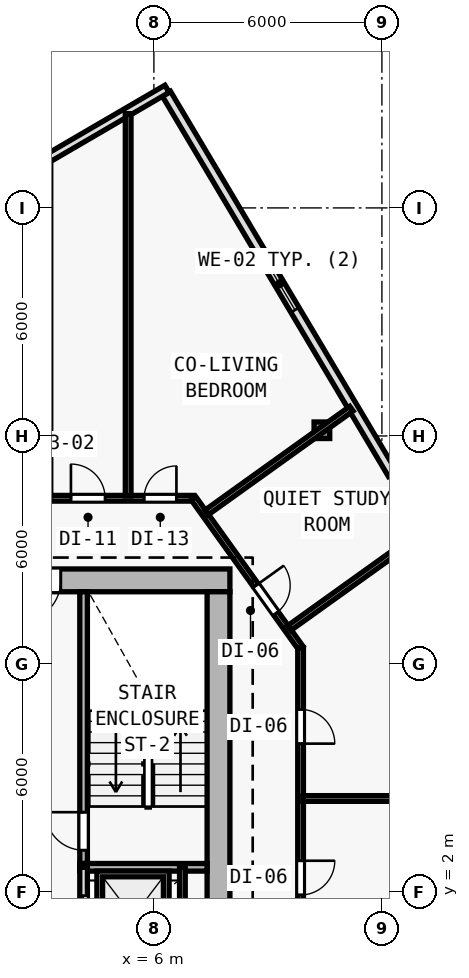
"""IFC4 building model, lengths in metres.
Left out: names, types, materials, properties, quantities, classifications, styles, units other than length and angle.
Written with IfcOpenShell. Run it as: python <this file> out.ifc"""

import sys

from ifc_helpers import new_model, si_unit, direction, frame, frame_2d, origin, origin_2d, place, context, subcontext, project, spatial, rectangle, i_section, extrude, element, fill, save


model = new_model("IFC4")
c1 = context("Model", 3, precision=1e-05, world=origin(), true_north=direction((0.0, 1.0)))
c2 = subcontext(c1, "Body", "Model", "MODEL_VIEW")
j1 = project(units=[si_unit("LENGTHUNIT", "METRE"), si_unit("PLANEANGLEUNIT", "RADIAN")], contexts=[c1])
p1 = place(None, origin())
s1 = spatial("IfcSite", under=j1, at=p1, CompositionType="ELEMENT")
p2 = place(p1, origin())
s2 = spatial("IfcBuilding", under=s1, at=p2, CompositionType="ELEMENT")
p3 = place(p2, frame((0.0, 0.0, 66.0)))
s3 = spatial("IfcBuildingStorey", under=s2, at=p3, CompositionType="ELEMENT", Elevation=66.0)
p4 = place(p3, frame((7.7, 10.2, 0.0), z_axis=(0.0, 0.0, 1.0), x_axis=(1.0, 0.0, 0.0)))
e1 = element("IfcColumn", 1, at=p4, inside=s3, PredefinedType="COLUMN", context=c2, shape_type="SweptSolid", body=[
    extrude(i_section(OverallWidth=0.416, OverallDepth=0.446, WebThickness=0.025, FlangeThickness=0.04, FilletRadius=0.015, at=origin_2d()), origin(), (0.0, 0.0, 1.0), 3.6),
])
p5 = place(p3, frame((10.421, 14.15, 0.006), z_axis=(-0.011699840322, -0.002584848443, 0.999928213571), x_axis=(0.215728093413, -0.976453475447, 0.0)))
e2 = element("IfcColumn", 2, at=p5, inside=s3, PredefinedType="COLUMN", context=c2, shape_type="SweptSolid", body=[
    extrude(i_section(OverallWidth=0.412, OverallDepth=0.435, WebThickness=0.023, FlangeThickness=0.037, FilletRadius=0.015, at=origin_2d()), origin(), (0.0, 0.0, 1.0), 3.589),
])
p6 = place(p3, frame((6.328, 23.006, 0.0), z_axis=(0.0, 0.0, 1.0), x_axis=(0.511075811474, -0.859535639125, 0.0)))
e3 = element("IfcWall", 3, at=p6, inside=s3, PredefinedType="SOLIDWALL", context=c2, shape_type="SweptSolid", body=[
    extrude(rectangle(XDim=11.646, YDim=0.25, at=frame_2d((5.823, 0.0))), origin(), (0.0, 0.0, 1.0), 3.35),
])
p7 = place(p6, frame((5.023, 0.0, 0.62)))
e4 = element("IfcOpeningElement", 4, at=p7, cuts=e3, PredefinedType="OPENING", context=c2, shape_type="SweptSolid", body=[
    extrude(rectangle(XDim=1.6, YDim=2.1, at=frame_2d((0.8, 1.05))), frame((0.0, 0.135, 0.0), z_axis=(0.0, -1.0, 0.0), x_axis=(1.0, 0.0, 0.0)), (0.0, 0.0, 1.0), 0.27),
])
p8 = place(p3, frame((2.193, 20.713, 0.0), z_axis=(0.0, 0.0, 1.0), x_axis=(0.863964978951, 0.503551899159, 0.0)))
e5 = element("IfcWall", 5, at=p8, inside=s3, PredefinedType="SOLIDWALL", context=c2, shape_type="SweptSolid", body=[
    extrude(rectangle(XDim=4.805, YDim=0.22, at=frame_2d((2.402, 0.0))), origin(), (0.0, 0.0, 1.0), 3.35),
])
p9 = place(p3, frame((8.0, 10.2, 0.0), z_axis=(0.0, 0.0, 1.0), x_axis=(-1.0, 0.0, 0.0)))
e6 = element("IfcWall", 6, at=p9, inside=s3, PredefinedType="SHEAR", context=c2, shape_type="SweptSolid", body=[
    extrude(rectangle(XDim=16.0, YDim=0.6, at=frame_2d((8.0, 0.0))), origin(), (0.0, 0.0, 1.0), 3.35),
])
p10 = place(p9, frame((4.45, 0.0, 0.0)))
e7 = element("IfcOpeningElement", 7, at=p10, cuts=e6, PredefinedType="OPENING", context=c2, shape_type="SweptSolid", body=[
    extrude(rectangle(XDim=1.1, YDim=2.15, at=frame_2d((0.55, 1.075))), frame((0.0, 0.31, 0.0), z_axis=(0.0, -1.0, 0.0), x_axis=(1.0, 0.0, 0.0)), (0.0, 0.0, 1.0), 0.62),
])
p11 = place(p3, frame((7.7, 9.9, 0.0), z_axis=(0.0, 0.0, 1.0), x_axis=(0.0, -1.0, 0.0)))
e8 = element("IfcWall", 8, at=p11, inside=s3, PredefinedType="SHEAR", context=c2, shape_type="SweptSolid", body=[
    extrude(rectangle(XDim=19.0, YDim=0.6, at=frame_2d((9.5, 0.0))), origin(), (0.0, 0.0, 1.0), 3.35),
])
p12 = place(p3, frame((4.15, 2.75, 0.0), z_axis=(0.0, 0.0, 1.0), x_axis=(0.0, 1.0, 0.0)))
e9 = element("IfcWall", 9, at=p12, inside=s3, PredefinedType="SOLIDWALL", context=c2, shape_type="SweptSolid", body=[
    extrude(rectangle(XDim=7.15, YDim=0.2, at=frame_2d((3.575, 0.0))), origin(), (0.0, 0.0, 1.0), 3.35),
])
p13 = place(p12, frame((0.35, 0.0, 0.0)))
e10 = element("IfcOpeningElement", 10, at=p13, cuts=e9, PredefinedType="OPENING", context=c2, shape_type="SweptSolid", body=[
    extrude(rectangle(XDim=1.0, YDim=2.15, at=frame_2d((0.5, 1.075))), frame((0.0, 0.11, 0.0), z_axis=(0.0, -1.0, 0.0), x_axis=(1.0, 0.0, 0.0)), (0.0, 0.0, 1.0), 0.22),
])
p14 = place(p3, frame((4.05, 2.65, 0.0), z_axis=(0.0, 0.0, 1.0), x_axis=(1.0, 0.0, 0.0)))
e11 = element("IfcWall", 11, at=p14, inside=s3, PredefinedType="SOLIDWALL", context=c2, shape_type="SweptSolid", body=[
    extrude(rectangle(XDim=3.35, YDim=0.2, at=frame_2d((1.675, 0.0))), origin(), (0.0, 0.0, 1.0), 3.35),
])
p15 = place(p3, frame((4.15, -6.05, 0.0), z_axis=(0.0, 0.0, 1.0), x_axis=(0.0, 1.0, 0.0)))
e12 = element("IfcWall", 12, at=p15, inside=s3, PredefinedType="SOLIDWALL", context=c2, shape_type="SweptSolid", body=[
    extrude(rectangle(XDim=8.7, YDim=0.2, at=frame_2d((4.35, 0.0))), origin(), (0.0, 0.0, 1.0), 3.35),
])
p16 = place(p15, frame((0.55, 0.0, 0.0)))
e13 = element("IfcOpeningElement", 13, at=p16, cuts=e12, PredefinedType="OPENING", context=c2, shape_type="SweptSolid", body=[
    extrude(rectangle(XDim=1.1, YDim=2.15, at=frame_2d((0.55, 1.075))), frame((0.0, 0.11, 0.0), z_axis=(0.0, -1.0, 0.0), x_axis=(1.0, 0.0, 0.0)), (0.0, 0.0, 1.0), 0.22),
])
p17 = place(p15, frame((2.65, 0.0, 0.0)))
e14 = element("IfcOpeningElement", 14, at=p17, cuts=e12, PredefinedType="OPENING", context=c2, shape_type="SweptSolid", body=[
    extrude(rectangle(XDim=1.1, YDim=2.15, at=frame_2d((0.55, 1.075))), frame((0.0, 0.11, 0.0), z_axis=(0.0, -1.0, 0.0), x_axis=(1.0, 0.0, 0.0)), (0.0, 0.0, 1.0), 0.22),
])
p18 = place(p15, frame((4.75, 0.0, 0.0)))
e15 = element("IfcOpeningElement", 15, at=p18, cuts=e12, PredefinedType="OPENING", context=c2, shape_type="SweptSolid", body=[
    extrude(rectangle(XDim=1.1, YDim=2.15, at=frame_2d((0.55, 1.075))), frame((0.0, 0.11, 0.0), z_axis=(0.0, -1.0, 0.0), x_axis=(1.0, 0.0, 0.0)), (0.0, 0.0, 1.0), 0.22),
])
p19 = place(p15, frame((6.85, 0.0, 0.0)))
e16 = element("IfcOpeningElement", 16, at=p19, cuts=e12, PredefinedType="OPENING", context=c2, shape_type="SweptSolid", body=[
    extrude(rectangle(XDim=1.1, YDim=2.15, at=frame_2d((0.55, 1.075))), frame((0.0, 0.11, 0.0), z_axis=(0.0, -1.0, 0.0), x_axis=(1.0, 0.0, 0.0)), (0.0, 0.0, 1.0), 0.22),
])
p20 = place(p3, frame((6.75, -6.05, 0.0), z_axis=(0.0, 0.0, 1.0), x_axis=(0.0, 1.0, 0.0)))
e17 = element("IfcWall", 17, at=p20, inside=s3, PredefinedType="PARTITIONING", context=c2, shape_type="SweptSolid", body=[
    extrude(rectangle(XDim=8.7, YDim=0.15, at=frame_2d((4.35, 0.0))), origin(), (0.0, 0.0, 1.0), 3.35),
])
p21 = place(p3, frame((-7.041, 12.36, 0.0), z_axis=(0.0, 0.0, 1.0), x_axis=(1.0, 0.0, 0.0)))
e18 = element("IfcWall", 18, at=p21, inside=s3, PredefinedType="PARTITIONING", context=c2, shape_type="SweptSolid", body=[
    extrude(rectangle(XDim=14.082, YDim=0.15, at=frame_2d((7.041, 0.0))), origin(), (0.0, 0.0, 1.0), 3.35),
])
p22 = place(p21, frame((12.784, 0.0, 0.0)))
e19 = element("IfcOpeningElement", 19, at=p22, cuts=e18, PredefinedType="OPENING", context=c2, shape_type="SweptSolid", body=[
    extrude(rectangle(XDim=0.85, YDim=2.1, at=frame_2d((0.425, 1.05))), frame((0.0, 0.085, 0.0), z_axis=(0.0, -1.0, 0.0), x_axis=(1.0, 0.0, 0.0)), (0.0, 0.0, 1.0), 0.17),
])
p23 = place(p21, frame((10.858, 0.0, 0.0)))
e20 = element("IfcOpeningElement", 20, at=p23, cuts=e18, PredefinedType="OPENING", context=c2, shape_type="SweptSolid", body=[
    extrude(rectangle(XDim=0.9, YDim=2.1, at=frame_2d((0.45, 1.05))), frame((0.0, 0.085, 0.0), z_axis=(0.0, -1.0, 0.0), x_axis=(1.0, 0.0, 0.0)), (0.0, 0.0, 1.0), 0.17),
])
p24 = place(p21, frame((8.904, 0.0, 0.0)))
e21 = element("IfcOpeningElement", 21, at=p24, cuts=e18, PredefinedType="OPENING", context=c2, shape_type="SweptSolid", body=[
    extrude(rectangle(XDim=0.85, YDim=2.1, at=frame_2d((0.425, 1.05))), frame((0.0, 0.085, 0.0), z_axis=(0.0, -1.0, 0.0), x_axis=(1.0, 0.0, 0.0)), (0.0, 0.0, 1.0), 0.17),
])
p25 = place(p21, frame((6.212, 0.0, 0.0)))
e22 = element("IfcOpeningElement", 22, at=p25, cuts=e18, PredefinedType="OPENING", context=c2, shape_type="SweptSolid", body=[
    extrude(rectangle(XDim=0.9, YDim=2.1, at=frame_2d((0.45, 1.05))), frame((0.0, 0.085, 0.0), z_axis=(0.0, -1.0, 0.0), x_axis=(1.0, 0.0, 0.0)), (0.0, 0.0, 1.0), 0.17),
])
p26 = place(p21, frame((3.763, 0.0, 0.0)))
e23 = element("IfcOpeningElement", 23, at=p26, cuts=e18, PredefinedType="OPENING", context=c2, shape_type="SweptSolid", body=[
    extrude(rectangle(XDim=0.85, YDim=2.1, at=frame_2d((0.425, 1.05))), frame((0.0, 0.085, 0.0), z_axis=(0.0, -1.0, 0.0), x_axis=(1.0, 0.0, 0.0)), (0.0, 0.0, 1.0), 0.17),
])
p27 = place(p21, frame((2.429, 0.0, 0.0)))
e24 = element("IfcOpeningElement", 24, at=p27, cuts=e18, PredefinedType="OPENING", context=c2, shape_type="SweptSolid", body=[
    extrude(rectangle(XDim=0.85, YDim=2.1, at=frame_2d((0.425, 1.05))), frame((0.0, 0.085, 0.0), z_axis=(0.0, -1.0, 0.0), x_axis=(1.0, 0.0, 0.0)), (0.0, 0.0, 1.0), 0.17),
])
p28 = place(p21, frame((0.74, 0.0, 0.0)))
e25 = element("IfcOpeningElement", 25, at=p28, cuts=e18, PredefinedType="OPENING", context=c2, shape_type="SweptSolid", body=[
    extrude(rectangle(XDim=0.9, YDim=2.1, at=frame_2d((0.45, 1.05))), frame((0.0, 0.085, 0.0), z_axis=(0.0, -1.0, 0.0), x_axis=(1.0, 0.0, 0.0)), (0.0, 0.0, 1.0), 0.17),
])
p29 = place(p3, frame((7.041, 12.36, 0.0), z_axis=(0.0, 0.0, 1.0), x_axis=(0.582449511476, -0.812866881218, 0.0)))
e26 = element("IfcWall", 26, at=p29, inside=s3, PredefinedType="PARTITIONING", context=c2, shape_type="SweptSolid", body=[
    extrude(rectangle(XDim=4.84, YDim=0.15, at=frame_2d((2.42, 0.0))), origin(), (0.0, 0.0, 1.0), 2.725),
])
p30 = place(p29, frame((2.825, 0.0, 0.0)))
e27 = element("IfcOpeningElement", 27, at=p30, cuts=e26, PredefinedType="OPENING", context=c2, shape_type="SweptSolid", body=[
    extrude(rectangle(XDim=0.9, YDim=2.1, at=frame_2d((0.45, 1.05))), frame((0.0, 0.085, 0.0), z_axis=(0.0, -1.0, 0.0), x_axis=(1.0, 0.0, 0.0)), (0.0, 0.0, 1.0), 0.17),
])
p31 = place(p3, frame((9.86, 8.426, 0.0), z_axis=(0.0, 0.0, 1.0), x_axis=(0.0, -1.0, 0.0)))
e28 = element("IfcWall", 28, at=p31, inside=s3, PredefinedType="PARTITIONING", context=c2, shape_type="SweptSolid", body=[
    extrude(rectangle(XDim=19.986, YDim=0.15, at=frame_2d((9.993, 0.0))), origin(), (0.0, 0.0, 1.0), 2.609),
])
p32 = place(p31, frame((18.142, 0.0, 0.0)))
e29 = element("IfcOpeningElement", 29, at=p32, cuts=e28, PredefinedType="OPENING", context=c2, shape_type="SweptSolid", body=[
    extrude(rectangle(XDim=0.9, YDim=2.1, at=frame_2d((0.45, 1.05))), frame((0.0, 0.085, 0.0), z_axis=(0.0, -1.0, 0.0), x_axis=(1.0, 0.0, 0.0)), (0.0, 0.0, 1.0), 0.17),
])
p33 = place(p31, frame((14.362, 0.0, 0.0)))
e30 = element("IfcOpeningElement", 30, at=p33, cuts=e28, PredefinedType="OPENING", context=c2, shape_type="SweptSolid", body=[
    extrude(rectangle(XDim=0.9, YDim=2.1, at=frame_2d((0.45, 1.05))), frame((0.0, 0.085, 0.0), z_axis=(0.0, -1.0, 0.0), x_axis=(1.0, 0.0, 0.0)), (0.0, 0.0, 1.0), 0.17),
])
p34 = place(p31, frame((9.744, 0.0, 0.0)))
e31 = element("IfcOpeningElement", 31, at=p34, cuts=e28, PredefinedType="OPENING", context=c2, shape_type="SweptSolid", body=[
    extrude(rectangle(XDim=0.9, YDim=2.1, at=frame_2d((0.45, 1.05))), frame((0.0, 0.085, 0.0), z_axis=(0.0, -1.0, 0.0), x_axis=(1.0, 0.0, 0.0)), (0.0, 0.0, 1.0), 0.17),
])
p35 = place(p31, frame((5.604, 0.0, 0.0)))
e32 = element("IfcOpeningElement", 32, at=p35, cuts=e28, PredefinedType="OPENING", context=c2, shape_type="SweptSolid", body=[
    extrude(rectangle(XDim=0.9, YDim=2.1, at=frame_2d((0.45, 1.05))), frame((0.0, 0.085, 0.0), z_axis=(0.0, -1.0, 0.0), x_axis=(1.0, 0.0, 0.0)), (0.0, 0.0, 1.0), 0.17),
])
p36 = place(p31, frame((1.622, 0.0, 0.0)))
e33 = element("IfcOpeningElement", 33, at=p36, cuts=e28, PredefinedType="OPENING", context=c2, shape_type="SweptSolid", body=[
    extrude(rectangle(XDim=0.9, YDim=2.1, at=frame_2d((0.45, 1.05))), frame((0.0, 0.085, 0.0), z_axis=(0.0, -1.0, 0.0), x_axis=(1.0, 0.0, 0.0)), (0.0, 0.0, 1.0), 0.17),
])
p37 = place(p3, frame((7.384, 11.984, 0.0), z_axis=(0.0, 0.0, 1.0), x_axis=(0.812878301618, 0.582433572829, 0.0)))
e34 = element("IfcWall", 34, at=p37, inside=s3, PredefinedType="PARTITIONING", context=c2, shape_type="SweptSolid", body=[
    extrude(rectangle(XDim=4.692, YDim=0.15, at=frame_2d((2.346, 0.0))), origin(), (0.0, 0.0, 1.0), 2.725),
])
p38 = place(p3, frame((5.323, 12.42, 0.0), z_axis=(0.0, 0.0, 1.0), x_axis=(0.0, 1.0, 0.0)))
e35 = element("IfcWall", 35, at=p38, inside=s3, PredefinedType="PARTITIONING", context=c2, shape_type="SweptSolid", body=[
    extrude(rectangle(XDim=10.06, YDim=0.15, at=frame_2d((5.03, 0.0))), origin(), (0.0, 0.0, 1.0), 2.735),
])
p39 = place(p3, frame((9.92, 4.46, 0.0), z_axis=(0.0, 0.0, 1.0), x_axis=(1.0, 0.0, 0.0)))
e36 = element("IfcWall", 36, at=p39, inside=s3, PredefinedType="PARTITIONING", context=c2, shape_type="SweptSolid", body=[
    extrude(rectangle(XDim=7.377, YDim=0.15, at=frame_2d((3.689, 0.0))), origin(), (0.0, 0.0, 1.0), 2.735),
])
p40 = place(p3, frame((9.562, 8.945, 0.0), z_axis=(0.0, 0.0, 1.0), x_axis=(0.812868674116, 0.582447009299, 0.0)))
e37 = element("IfcWall", 37, at=p40, inside=s3, PredefinedType="PARTITIONING", context=c2, shape_type="SweptSolid", body=[
    extrude(rectangle(XDim=4.373, YDim=0.15, at=frame_2d((2.187, 0.0))), origin(), (0.0, 0.0, 1.0), 2.735),
])
p41 = place(p7, origin())
e38 = element("IfcWindow", 38, at=p41, inside=s3, PartitioningType="SINGLE_PANEL", PredefinedType="WINDOW", context=c2, shape_type="SweptSolid", body=[
    extrude(rectangle(XDim=1.6, YDim=2.1, at=frame_2d((0.8, 1.05))), frame((0.0, 0.03, 0.0), z_axis=(0.0, -1.0, 0.0), x_axis=(1.0, 0.0, 0.0)), (0.0, 0.0, 1.0), 0.06),
])
fill(e4, e38)
p42 = place(p10, origin())
e39 = element("IfcDoor", 39, at=p42, inside=s3, OperationType="SINGLE_SWING_RIGHT", PredefinedType="DOOR", context=c2, shape_type="SweptSolid", body=[
    extrude(rectangle(XDim=1.1, YDim=2.15, at=frame_2d((0.55, 1.075))), frame((0.0, 0.025, 0.0), z_axis=(0.0, -1.0, 0.0), x_axis=(1.0, 0.0, 0.0)), (0.0, 0.0, 1.0), 0.05),
])
fill(e7, e39)
p43 = place(p13, origin())
e40 = element("IfcDoor", 40, at=p43, inside=s3, OperationType="SINGLE_SWING_RIGHT", PredefinedType="DOOR", context=c2, shape_type="SweptSolid", body=[
    extrude(rectangle(XDim=1.0, YDim=2.15, at=frame_2d((0.5, 1.075))), frame((0.0, 0.025, 0.0), z_axis=(0.0, -1.0, 0.0), x_axis=(1.0, 0.0, 0.0)), (0.0, 0.0, 1.0), 0.05),
])
fill(e10, e40)
p44 = place(p19, origin())
e41 = element("IfcDoor", 41, at=p44, inside=s3, OperationType="DOUBLE_DOOR_SLIDING", PredefinedType="DOOR", context=c2, shape_type="SweptSolid", body=[
    extrude(rectangle(XDim=1.1, YDim=2.15, at=frame_2d((0.55, 1.075))), frame((0.0, 0.025, 0.0), z_axis=(0.0, -1.0, 0.0), x_axis=(1.0, 0.0, 0.0)), (0.0, 0.0, 1.0), 0.05),
])
fill(e16, e41)
p45 = place(p35, origin())
e42 = element("IfcDoor", 42, at=p45, inside=s3, OperationType="SINGLE_SWING_LEFT", PredefinedType="DOOR", context=c2, shape_type="SweptSolid", body=[
    extrude(rectangle(XDim=0.9, YDim=2.1, at=frame_2d((0.45, 1.05))), frame((0.0, 0.025, 0.0), z_axis=(0.0, -1.0, 0.0), x_axis=(1.0, 0.0, 0.0)), (0.0, 0.0, 1.0), 0.05),
])
fill(e32, e42)
p46 = place(p36, origin())
e43 = element("IfcDoor", 43, at=p46, inside=s3, OperationType="SINGLE_SWING_RIGHT", PredefinedType="DOOR", context=c2, shape_type="SweptSolid", body=[
    extrude(rectangle(XDim=0.9, YDim=2.1, at=frame_2d((0.45, 1.05))), frame((0.0, 0.025, 0.0), z_axis=(0.0, -1.0, 0.0), x_axis=(1.0, 0.0, 0.0)), (0.0, 0.0, 1.0), 0.05),
])
fill(e33, e43)
p47 = place(p30, origin())
e44 = element("IfcDoor", 44, at=p47, inside=s3, OperationType="SINGLE_SWING_LEFT", PredefinedType="DOOR", context=c2, shape_type="SweptSolid", body=[
    extrude(rectangle(XDim=0.9, YDim=2.1, at=frame_2d((0.45, 1.05))), frame((0.0, 0.025, 0.0), z_axis=(0.0, -1.0, 0.0), x_axis=(1.0, 0.0, 0.0)), (0.0, 0.0, 1.0), 0.05),
])
fill(e27, e44)
p48 = place(p22, origin())
e45 = element("IfcDoor", 45, at=p48, inside=s3, OperationType="SINGLE_SWING_RIGHT", PredefinedType="DOOR", context=c2, shape_type="SweptSolid", body=[
    extrude(rectangle(XDim=0.85, YDim=2.1, at=frame_2d((0.425, 1.05))), frame((0.0, 0.025, 0.0), z_axis=(0.0, -1.0, 0.0), x_axis=(1.0, 0.0, 0.0)), (0.0, 0.0, 1.0), 0.05),
])
fill(e19, e45)
p49 = place(p23, origin())
e46 = element("IfcDoor", 46, at=p49, inside=s3, OperationType="SINGLE_SWING_LEFT", PredefinedType="DOOR", context=c2, shape_type="SweptSolid", body=[
    extrude(rectangle(XDim=0.9, YDim=2.1, at=frame_2d((0.45, 1.05))), frame((0.0, 0.025, 0.0), z_axis=(0.0, -1.0, 0.0), x_axis=(1.0, 0.0, 0.0)), (0.0, 0.0, 1.0), 0.05),
])
fill(e20, e46)
save(model, sys.argv[1])
